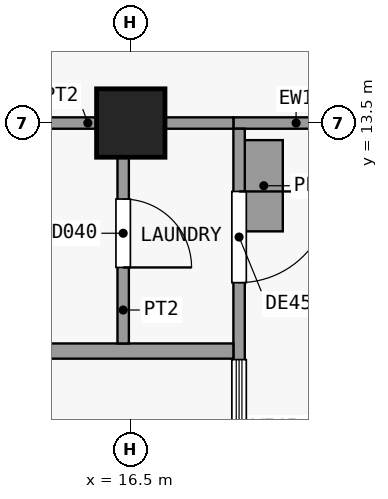
"""IFC4 building model, lengths in metres.
Left out: names, types, materials, properties, quantities, classifications, styles, units other than length and angle.
Written with IfcOpenShell. Run it as: python <this file> out.ifc"""

import sys

from ifc_helpers import new_model, si_unit, direction, frame, frame_2d, origin, origin_2d, place, context, subcontext, project, spatial, rectangle, extrude, element, fill, save


model = new_model("IFC4")
c1 = context("Model", 3, precision=1e-05, world=origin(), true_north=direction((0.0, 1.0)))
c2 = subcontext(c1, "Body", "Model", "MODEL_VIEW")
j1 = project(units=[si_unit("LENGTHUNIT", "METRE"), si_unit("PLANEANGLEUNIT", "RADIAN")], contexts=[c1])
p1 = place(None, origin())
s1 = spatial("IfcSite", under=j1, at=p1, CompositionType="ELEMENT")
p2 = place(p1, origin())
s2 = spatial("IfcBuilding", under=s1, at=p2, CompositionType="ELEMENT")
p3 = place(p2, frame((0.0, 0.0, 181.7)))
s3 = spatial("IfcBuildingStorey", under=s2, at=p3, CompositionType="ELEMENT", Elevation=181.7)
p4 = place(p3, frame((16.5, 13.5, 0.0), z_axis=(0.0, 0.0, 1.0), x_axis=(1.0, 0.0, 0.0)))
e1 = element("IfcColumn", 1, at=p4, inside=s3, PredefinedType="COLUMN", context=c2, shape_type="SweptSolid", body=[
    extrude(rectangle(XDim=0.9, YDim=0.9, at=origin_2d()), origin(), (0.0, 0.0, 1.0), 3.6),
])
p5 = place(p3, frame((17.85, 13.5, 0.0), z_axis=(0.0, 0.0, 1.0), x_axis=(1.0, 0.0, 0.0)))
e2 = element("IfcWall", 2, at=p5, inside=s3, PredefinedType="SOLIDWALL", context=c2, shape_type="SweptSolid", body=[
    extrude(rectangle(XDim=1.65, YDim=0.15, at=frame_2d((0.825, 0.0))), origin(), (0.0, 0.0, 1.0), 3.3),
])
p6 = place(p3, frame((17.925, 13.425, 0.0), z_axis=(0.0, 0.0, 1.0), x_axis=(0.0, -1.0, 0.0)))
e3 = element("IfcWall", 3, at=p6, inside=s3, PredefinedType="SOLIDWALL", context=c2, shape_type="SweptSolid", body=[
    extrude(rectangle(XDim=5.85, YDim=0.15, at=frame_2d((2.925, 0.0))), origin(), (0.0, 0.0, 1.0), 3.3),
])
p7 = place(p6, frame((0.825, 0.0, 0.0)))
e4 = element("IfcOpeningElement", 4, at=p7, cuts=e3, PredefinedType="OPENING", context=c2, shape_type="SweptSolid", body=[
    extrude(rectangle(XDim=1.2, YDim=2.4, at=frame_2d((0.6, 1.2))), frame((0.0, 0.085, 0.0), z_axis=(0.0, -1.0, 0.0), x_axis=(1.0, 0.0, 0.0)), (0.0, 0.0, 1.0), 0.17),
])
p8 = place(p6, frame((3.038, 0.0, 0.9)))
e5 = element("IfcOpeningElement", 5, at=p8, cuts=e3, PredefinedType="OPENING", context=c2, shape_type="SweptSolid", body=[
    extrude(rectangle(XDim=1.8, YDim=2.1, at=frame_2d((0.9, 1.05))), frame((0.0, 0.085, 0.0), z_axis=(0.0, -1.0, 0.0), x_axis=(1.0, 0.0, 0.0)), (0.0, 0.0, 1.0), 0.17),
])
p9 = place(p3, frame((18.25, 12.075, 0.0), z_axis=(0.0, 0.0, 1.0), x_axis=(0.0, 1.0, 0.0)))
e6 = element("IfcWall", 6, at=p9, inside=s3, PredefinedType="USERDEFINED", context=c2, shape_type="SweptSolid", body=[
    extrude(rectangle(XDim=1.2, YDim=0.5, at=frame_2d((0.6, 0.0))), origin(), (0.0, 0.0, 1.0), 0.9),
])
p10 = place(p3, frame((-17.75, 10.5, 0.0), z_axis=(0.0, 0.0, 1.0), x_axis=(1.0, 0.0, 0.0)))
e7 = element("IfcWall", 7, at=p10, inside=s3, PredefinedType="PARTITIONING", context=c2, shape_type="SweptSolid", body=[
    extrude(rectangle(XDim=35.6, YDim=0.2, at=frame_2d((17.8, 0.0))), origin(), (0.0, 0.0, 1.0), 3.3),
])
p11 = place(p10, frame((11.45, 0.0, 0.0)))
e8 = element("IfcOpeningElement", 8, at=p11, cuts=e7, PredefinedType="OPENING", context=c2, shape_type="SweptSolid", body=[
    extrude(rectangle(XDim=1.0, YDim=2.1, at=frame_2d((0.5, 1.05))), frame((0.0, 0.11, 0.0), z_axis=(0.0, -1.0, 0.0), x_axis=(1.0, 0.0, 0.0)), (0.0, 0.0, 1.0), 0.22),
])
p12 = place(p10, frame((25.45, 0.0, 0.0)))
e9 = element("IfcOpeningElement", 9, at=p12, cuts=e7, PredefinedType="OPENING", context=c2, shape_type="SweptSolid", body=[
    extrude(rectangle(XDim=1.0, YDim=2.1, at=frame_2d((0.5, 1.05))), frame((0.0, 0.11, 0.0), z_axis=(0.0, -1.0, 0.0), x_axis=(1.0, 0.0, 0.0)), (0.0, 0.0, 1.0), 0.22),
])
p13 = place(p3, frame((9.4, 13.5, 0.0), z_axis=(0.0, 0.0, 1.0), x_axis=(1.0, 0.0, 0.0)))
e10 = element("IfcWall", 10, at=p13, inside=s3, PredefinedType="PARTITIONING", context=c2, shape_type="SweptSolid", body=[
    extrude(rectangle(XDim=8.45, YDim=0.15, at=frame_2d((4.225, 0.0))), origin(), (0.0, 0.0, 1.0), 3.3),
])
p14 = place(p13, frame((3.6, 0.0, 0.0)))
e11 = element("IfcOpeningElement", 11, at=p14, cuts=e10, PredefinedType="OPENING", context=c2, shape_type="SweptSolid", body=[
    extrude(rectangle(XDim=0.9, YDim=2.1, at=frame_2d((0.45, 1.05))), frame((0.0, 0.085, 0.0), z_axis=(0.0, -1.0, 0.0), x_axis=(1.0, 0.0, 0.0)), (0.0, 0.0, 1.0), 0.17),
])
p15 = place(p3, frame((16.4, 10.6, 0.0), z_axis=(0.0, 0.0, 1.0), x_axis=(0.0, 1.0, 0.0)))
e12 = element("IfcWall", 12, at=p15, inside=s3, PredefinedType="PARTITIONING", context=c2, shape_type="SweptSolid", body=[
    extrude(rectangle(XDim=2.825, YDim=0.15, at=frame_2d((1.413, 0.0))), origin(), (0.0, 0.0, 1.0), 3.3),
])
p16 = place(p15, frame((1.0, 0.0, 0.0)))
e13 = element("IfcOpeningElement", 13, at=p16, cuts=e12, PredefinedType="OPENING", context=c2, shape_type="SweptSolid", body=[
    extrude(rectangle(XDim=0.9, YDim=2.1, at=frame_2d((0.45, 1.05))), frame((0.0, 0.085, 0.0), z_axis=(0.0, -1.0, 0.0), x_axis=(1.0, 0.0, 0.0)), (0.0, 0.0, 1.0), 0.17),
])
p17 = place(p7, origin())
e14 = element("IfcDoor", 14, at=p17, inside=s3, OperationType="SINGLE_SWING_LEFT", PredefinedType="DOOR", context=c2, shape_type="SweptSolid", body=[
    extrude(rectangle(XDim=1.2, YDim=2.4, at=frame_2d((0.6, 1.2))), frame((0.0, 0.025, 0.0), z_axis=(0.0, -1.0, 0.0), x_axis=(1.0, 0.0, 0.0)), (0.0, 0.0, 1.0), 0.05),
])
fill(e4, e14)
p18 = place(p8, origin())
e15 = element("IfcWindow", 15, at=p18, inside=s3, PartitioningType="SINGLE_PANEL", PredefinedType="WINDOW", context=c2, shape_type="SweptSolid", body=[
    extrude(rectangle(XDim=1.8, YDim=2.1, at=frame_2d((0.9, 1.05))), frame((0.0, 0.03, 0.0), z_axis=(0.0, -1.0, 0.0), x_axis=(1.0, 0.0, 0.0)), (0.0, 0.0, 1.0), 0.06),
])
fill(e5, e15)
p19 = place(p16, origin())
e16 = element("IfcDoor", 16, at=p19, inside=s3, OperationType="SINGLE_SWING_LEFT", PredefinedType="DOOR", context=c2, shape_type="SweptSolid", body=[
    extrude(rectangle(XDim=0.9, YDim=2.1, at=frame_2d((0.45, 1.05))), frame((0.0, 0.025, 0.0), z_axis=(0.0, -1.0, 0.0), x_axis=(1.0, 0.0, 0.0)), (0.0, 0.0, 1.0), 0.05),
])
fill(e13, e16)
save(model, sys.argv[1])
